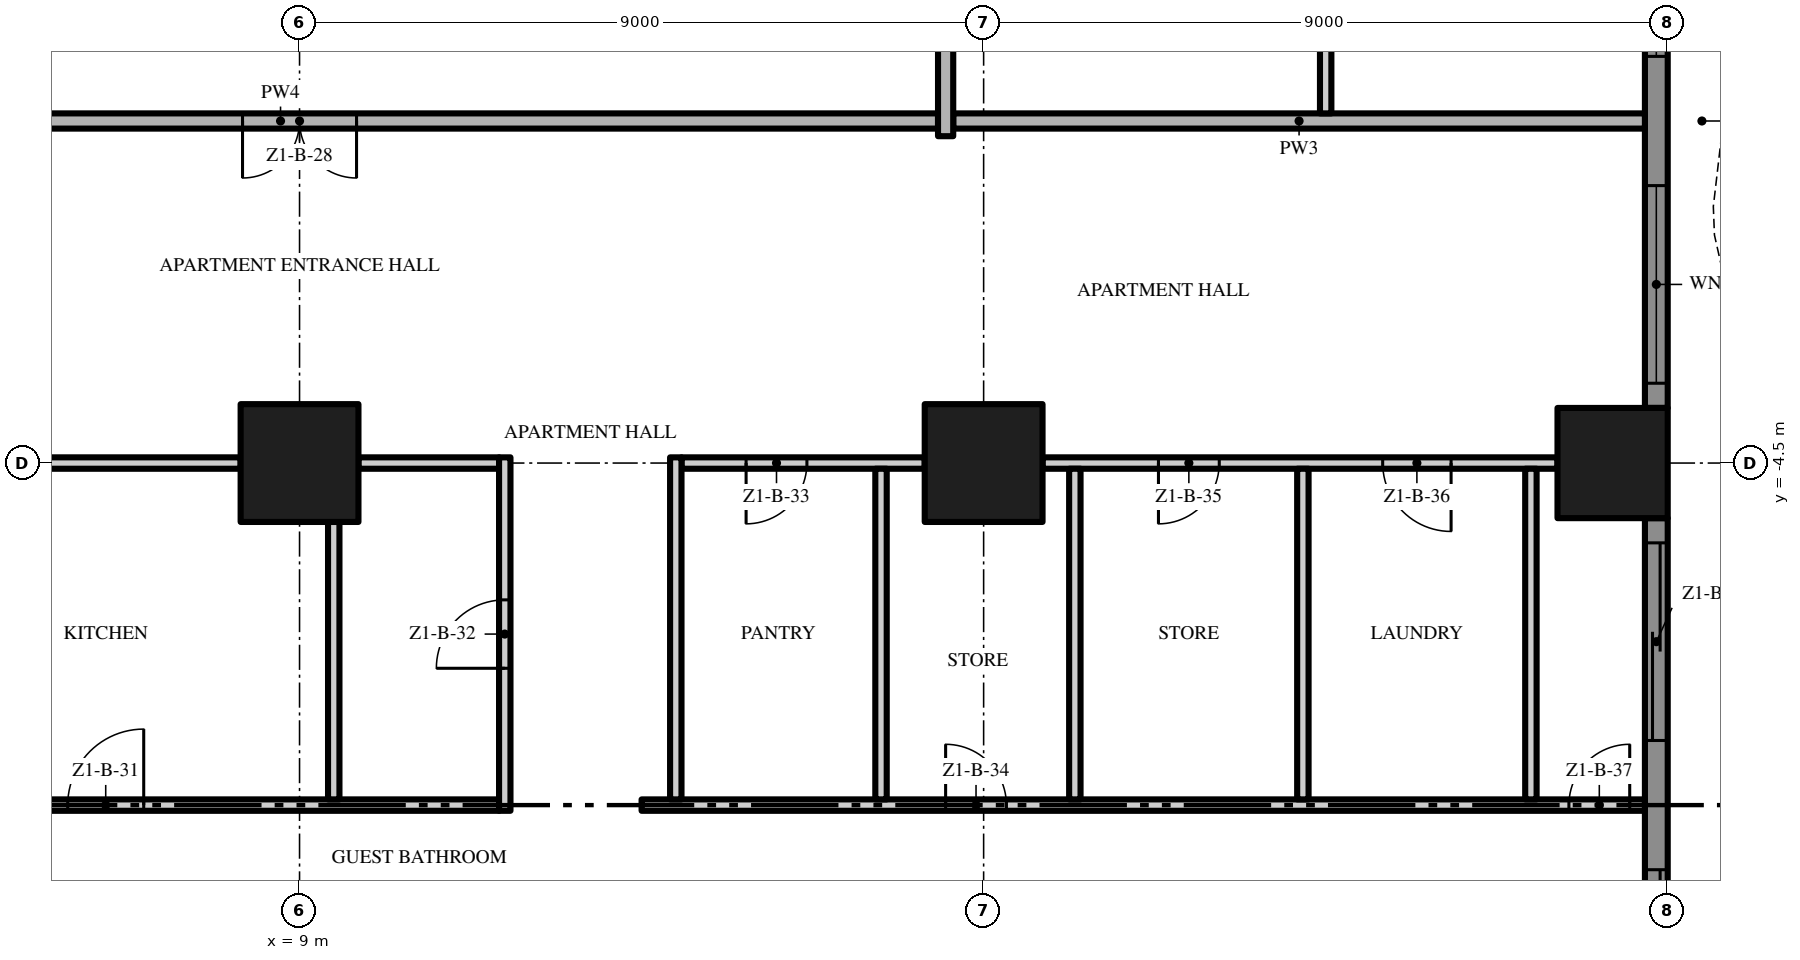
"""IFC4 building model, lengths in metres.
Left out: names, types, materials, properties, quantities, classifications, styles, units other than length and angle.
Written with IfcOpenShell. Run it as: python <this file> out.ifc"""

import sys

from ifc_helpers import new_model, si_unit, direction, frame, frame_2d, origin, origin_2d, place, context, subcontext, project, spatial, polyline, rectangle, outline, extrude, element, fill, save


model = new_model("IFC4")
c1 = context("Model", 3, precision=1e-05, world=origin(), true_north=direction((0.0, 1.0)))
c2 = subcontext(c1, "Body", "Model", "MODEL_VIEW")
j1 = project(units=[si_unit("LENGTHUNIT", "METRE"), si_unit("PLANEANGLEUNIT", "RADIAN")], contexts=[c1])
p1 = place(None, origin())
s1 = spatial("IfcSite", under=j1, at=p1, CompositionType="ELEMENT")
p2 = place(p1, origin())
s2 = spatial("IfcBuilding", under=s1, at=p2, CompositionType="ELEMENT")
p3 = place(p2, frame((0.0, 0.0, 34.0)))
s3 = spatial("IfcBuildingStorey", under=s2, at=p3, CompositionType="ELEMENT", Elevation=34.0)
p4 = place(p3, frame((18.0, -4.5, 0.0), z_axis=(0.0, 0.0, 1.0), x_axis=(1.0, 0.0, 0.0)))
e1 = element("IfcColumn", 1, at=p4, inside=s3, PredefinedType="COLUMN", context=c2, shape_type="SweptSolid", body=[
    extrude(rectangle(XDim=1.55, YDim=1.55, at=origin_2d()), origin(), (0.0, 0.0, 1.0), 3.5),
])
p5 = place(p3, frame((26.275, -4.5, 0.0), z_axis=(0.0, 0.0, 1.0), x_axis=(1.0, 0.0, 0.0)))
e2 = element("IfcColumn", 2, at=p5, inside=s3, PredefinedType="COLUMN", context=c2, shape_type="SweptSolid", body=[
    extrude(rectangle(XDim=1.45, YDim=1.45, at=origin_2d()), origin(), (0.0, 0.0, 1.0), 3.5),
])
p6 = place(p3, frame((9.0, -4.5, 0.0), z_axis=(0.0, 0.0, 1.0), x_axis=(1.0, 0.0, 0.0)))
e3 = element("IfcColumn", 3, at=p6, inside=s3, PredefinedType="COLUMN", context=c2, shape_type="SweptSolid", body=[
    extrude(rectangle(XDim=1.55, YDim=1.55, at=origin_2d()), origin(), (0.0, 0.0, 1.0), 3.5),
])
p7 = place(p3, frame((26.85, -5.225, 0.0), z_axis=(0.0, 0.0, 1.0), x_axis=(0.0, -1.0, 0.0)))
e4 = element("IfcWall", 4, at=p7, inside=s3, PredefinedType="SOLIDWALL", context=c2, shape_type="SweptSolid", body=[
    extrude(rectangle(XDim=7.55, YDim=0.3, at=frame_2d((3.775, 0.0))), origin(), (0.0, 0.0, 1.0), 3.5),
])
p8 = place(p7, frame((4.625, 0.0, 0.0)))
e5 = element("IfcOpeningElement", 5, at=p8, cuts=e4, PredefinedType="OPENING", context=c2, shape_type="SweptSolid", body=[
    extrude(rectangle(XDim=2.6, YDim=2.4, at=frame_2d((1.3, 1.2))), frame((0.0, 0.16, 0.0), z_axis=(0.0, -1.0, 0.0), x_axis=(1.0, 0.0, 0.0)), (0.0, 0.0, 1.0), 0.32),
])
p9 = place(p7, frame((0.325, 0.0, 0.0)))
e6 = element("IfcOpeningElement", 6, at=p9, cuts=e4, PredefinedType="OPENING", context=c2, shape_type="SweptSolid", body=[
    extrude(rectangle(XDim=2.6, YDim=2.4, at=frame_2d((1.3, 1.2))), frame((0.0, 0.16, 0.0), z_axis=(0.0, -1.0, 0.0), x_axis=(1.0, 0.0, 0.0)), (0.0, 0.0, 1.0), 0.32),
])
p10 = place(p3, frame((26.85, 3.775, 0.0), z_axis=(0.0, 0.0, 1.0), x_axis=(0.0, -1.0, 0.0)))
e7 = element("IfcWall", 7, at=p10, inside=s3, PredefinedType="SOLIDWALL", context=c2, shape_type="SweptSolid", body=[
    extrude(rectangle(XDim=7.55, YDim=0.3, at=frame_2d((3.775, 0.0))), origin(), (0.0, 0.0, 1.0), 3.5),
])
p11 = place(p10, frame((4.625, 0.0, 0.45)))
e8 = element("IfcOpeningElement", 8, at=p11, cuts=e7, PredefinedType="OPENING", context=c2, shape_type="SweptSolid", body=[
    extrude(rectangle(XDim=2.6, YDim=2.65, at=frame_2d((1.3, 1.325))), frame((0.0, 0.16, 0.0), z_axis=(0.0, -1.0, 0.0), x_axis=(1.0, 0.0, 0.0)), (0.0, 0.0, 1.0), 0.32),
])
p12 = place(p10, frame((0.325, 0.0, 0.45)))
e9 = element("IfcOpeningElement", 9, at=p12, cuts=e7, PredefinedType="OPENING", context=c2, shape_type="SweptSolid", body=[
    extrude(rectangle(XDim=2.6, YDim=2.65, at=frame_2d((1.3, 1.325))), frame((0.0, 0.16, 0.0), z_axis=(0.0, -1.0, 0.0), x_axis=(1.0, 0.0, 0.0)), (0.0, 0.0, 1.0), 0.32),
])
p13 = place(p3, origin())
e10 = element("IfcWall", 10, at=p13, inside=s3, PredefinedType="USERDEFINED", context=c2, shape_type="SweptSolid", body=[
    extrude(outline(polyline([(27.951, -18.0), (27.615, -16.5), (27.6, -16.125), (27.731, -15.0), (28.255, -13.5), (28.988, -12.0), (29.649, -10.5), (29.985, -9.0), (30.0, -8.625), (29.869, -7.5), (29.345, -6.0), (28.612, -4.5), (27.951, -3.0), (27.615, -1.5), (27.6, -1.125), (27.731, 0.0), (28.255, 1.5), (28.988, 3.0), (29.649, 4.5), (29.985, 6.0), (30.0, 6.375), (29.869, 7.5), (29.345, 9.0), (28.612, 10.5), (27.951, 12.0), (27.615, 13.5), (27.6, 13.875), (27.731, 15.0), (28.255, 16.5), (28.988, 18.0), (28.763, 18.11), (28.024, 16.596), (27.486, 15.056), (27.349, 13.885), (27.366, 13.467), (27.713, 11.921), (28.385, 10.395), (29.114, 8.904), (29.624, 7.444), (29.749, 6.365), (29.736, 6.033), (29.41, 4.579), (28.761, 3.105), (28.024, 1.596), (27.486, 0.056), (27.349, -1.115), (27.366, -1.533), (27.713, -3.079), (28.385, -4.605), (29.114, -6.096), (29.624, -7.556), (29.749, -8.635), (29.736, -8.967), (29.41, -10.421), (28.761, -11.895), (28.024, -13.404), (27.486, -14.944), (27.349, -16.115), (27.366, -16.533), (27.708, -18.055), (27.951, -18.0)])), origin(), (0.0, 0.0, 1.0), 0.9),
])
p14 = place(p3, frame((0.1, -9.0, 0.0), z_axis=(0.0, 0.0, 1.0), x_axis=(1.0, 0.0, 0.0)))
e11 = element("IfcWall", 11, at=p14, inside=s3, PredefinedType="PARTITIONING", context=c2, shape_type="SweptSolid", body=[
    extrude(rectangle(XDim=11.525, YDim=0.15, at=frame_2d((5.763, 0.0))), origin(), (0.0, 0.0, 1.0), 3.5),
])
p15 = place(p14, frame((0.4, 0.0, 0.0)))
e12 = element("IfcOpeningElement", 12, at=p15, cuts=e11, PredefinedType="OPENING", context=c2, shape_type="SweptSolid", body=[
    extrude(rectangle(XDim=0.8, YDim=2.0, at=frame_2d((0.4, 1.0))), frame((0.0, 0.085, 0.0), z_axis=(0.0, -1.0, 0.0), x_axis=(1.0, 0.0, 0.0)), (0.0, 0.0, 1.0), 0.17),
])
p16 = place(p14, frame((5.85, 0.0, 0.0)))
e13 = element("IfcOpeningElement", 13, at=p16, cuts=e11, PredefinedType="OPENING", context=c2, shape_type="SweptSolid", body=[
    extrude(rectangle(XDim=1.0, YDim=2.4, at=frame_2d((0.5, 1.2))), frame((0.0, 0.085, 0.0), z_axis=(0.0, -1.0, 0.0), x_axis=(1.0, 0.0, 0.0)), (0.0, 0.0, 1.0), 0.17),
])
p17 = place(p3, frame((13.5, -9.0, 0.0), z_axis=(0.0, 0.0, 1.0), x_axis=(1.0, 0.0, 0.0)))
e14 = element("IfcWall", 14, at=p17, inside=s3, PredefinedType="PARTITIONING", context=c2, shape_type="SweptSolid", body=[
    extrude(rectangle(XDim=13.2, YDim=0.15, at=frame_2d((6.6, 0.0))), origin(), (0.0, 0.0, 1.0), 3.5),
])
p18 = place(p17, frame((4.0, 0.0, 0.0)))
e15 = element("IfcOpeningElement", 15, at=p18, cuts=e14, PredefinedType="OPENING", context=c2, shape_type="SweptSolid", body=[
    extrude(rectangle(XDim=0.8, YDim=2.0, at=frame_2d((0.4, 1.0))), frame((0.0, 0.085, 0.0), z_axis=(0.0, -1.0, 0.0), x_axis=(1.0, 0.0, 0.0)), (0.0, 0.0, 1.0), 0.17),
])
p19 = place(p17, frame((12.2, 0.0, 0.0)))
e16 = element("IfcOpeningElement", 16, at=p19, cuts=e14, PredefinedType="OPENING", context=c2, shape_type="SweptSolid", body=[
    extrude(rectangle(XDim=0.8, YDim=2.0, at=frame_2d((0.4, 1.0))), frame((0.0, 0.085, 0.0), z_axis=(0.0, -1.0, 0.0), x_axis=(1.0, 0.0, 0.0)), (0.0, 0.0, 1.0), 0.17),
])
p20 = place(p3, frame((8.225, -4.5, 0.0), z_axis=(0.0, 0.0, 1.0), x_axis=(-1.0, 0.0, 0.0)))
e17 = element("IfcWall", 17, at=p20, inside=s3, PredefinedType="PARTITIONING", context=c2, shape_type="SweptSolid", body=[
    extrude(rectangle(XDim=7.45, YDim=0.15, at=frame_2d((3.725, 0.0))), origin(), (0.0, 0.0, 1.0), 3.5),
])
p21 = place(p20, frame((5.225, 0.0, 0.0)))
e18 = element("IfcOpeningElement", 18, at=p21, cuts=e17, PredefinedType="OPENING", context=c2, shape_type="SweptSolid", body=[
    extrude(rectangle(XDim=0.8, YDim=2.0, at=frame_2d((0.4, 1.0))), frame((0.0, 0.085, 0.0), z_axis=(0.0, -1.0, 0.0), x_axis=(1.0, 0.0, 0.0)), (0.0, 0.0, 1.0), 0.17),
])
p22 = place(p3, frame((9.775, -4.5, 0.0), z_axis=(0.0, 0.0, 1.0), x_axis=(1.0, 0.0, 0.0)))
e19 = element("IfcWall", 19, at=p22, inside=s3, PredefinedType="PARTITIONING", context=c2, shape_type="SweptSolid", body=[
    extrude(rectangle(XDim=1.85, YDim=0.15, at=frame_2d((0.925, 0.0))), origin(), (0.0, 0.0, 1.0), 3.5),
])
p23 = place(p3, frame((17.225, -4.5, 0.0), z_axis=(0.0, 0.0, 1.0), x_axis=(-1.0, 0.0, 0.0)))
e20 = element("IfcWall", 20, at=p23, inside=s3, PredefinedType="PARTITIONING", context=c2, shape_type="SweptSolid", body=[
    extrude(rectangle(XDim=3.2, YDim=0.15, at=frame_2d((1.6, 0.0))), origin(), (0.0, 0.0, 1.0), 3.5),
])
p24 = place(p23, frame((1.55, 0.0, 0.0)))
e21 = element("IfcOpeningElement", 21, at=p24, cuts=e20, PredefinedType="OPENING", context=c2, shape_type="SweptSolid", body=[
    extrude(rectangle(XDim=0.8, YDim=2.0, at=frame_2d((0.4, 1.0))), frame((0.0, 0.085, 0.0), z_axis=(0.0, -1.0, 0.0), x_axis=(1.0, 0.0, 0.0)), (0.0, 0.0, 1.0), 0.17),
])
p25 = place(p3, frame((25.55, -4.5, 0.0), z_axis=(0.0, 0.0, 1.0), x_axis=(-1.0, 0.0, 0.0)))
e22 = element("IfcWall", 22, at=p25, inside=s3, PredefinedType="PARTITIONING", context=c2, shape_type="SweptSolid", body=[
    extrude(rectangle(XDim=6.775, YDim=0.15, at=frame_2d((3.388, 0.0))), origin(), (0.0, 0.0, 1.0), 3.5),
])
p26 = place(p25, frame((4.45, 0.0, 0.0)))
e23 = element("IfcOpeningElement", 23, at=p26, cuts=e22, PredefinedType="OPENING", context=c2, shape_type="SweptSolid", body=[
    extrude(rectangle(XDim=0.8, YDim=2.0, at=frame_2d((0.4, 1.0))), frame((0.0, 0.085, 0.0), z_axis=(0.0, -1.0, 0.0), x_axis=(1.0, 0.0, 0.0)), (0.0, 0.0, 1.0), 0.17),
])
p27 = place(p25, frame((1.4, 0.0, 0.0)))
e24 = element("IfcOpeningElement", 24, at=p27, cuts=e22, PredefinedType="OPENING", context=c2, shape_type="SweptSolid", body=[
    extrude(rectangle(XDim=0.9, YDim=2.1, at=frame_2d((0.45, 1.05))), frame((0.0, 0.085, 0.0), z_axis=(0.0, -1.0, 0.0), x_axis=(1.0, 0.0, 0.0)), (0.0, 0.0, 1.0), 0.17),
])
p28 = place(p3, frame((17.4, 0.0, 0.0), z_axis=(0.0, 0.0, 1.0), x_axis=(-1.0, 0.0, 0.0)))
e25 = element("IfcWall", 25, at=p28, inside=s3, PredefinedType="PARTITIONING", context=c2, shape_type="SweptSolid", body=[
    extrude(rectangle(XDim=17.3, YDim=0.2, at=frame_2d((8.65, 0.0))), origin(), (0.0, 0.0, 1.0), 3.5),
])
p29 = place(p28, frame((7.65, 0.0, 0.0)))
e26 = element("IfcOpeningElement", 26, at=p29, cuts=e25, PredefinedType="OPENING", context=c2, shape_type="SweptSolid", body=[
    extrude(rectangle(XDim=1.5, YDim=2.4, at=frame_2d((0.75, 1.2))), frame((0.0, 0.11, 0.0), z_axis=(0.0, -1.0, 0.0), x_axis=(1.0, 0.0, 0.0)), (0.0, 0.0, 1.0), 0.22),
])
p30 = place(p3, frame((17.6, 0.0, 0.0), z_axis=(0.0, 0.0, 1.0), x_axis=(1.0, 0.0, 0.0)))
e27 = element("IfcWall", 27, at=p30, inside=s3, PredefinedType="PARTITIONING", context=c2, shape_type="SweptSolid", body=[
    extrude(rectangle(XDim=9.1, YDim=0.2, at=frame_2d((4.55, 0.0))), origin(), (0.0, 0.0, 1.0), 3.5),
])
p31 = place(p3, frame((9.45, -8.925, 0.0), z_axis=(0.0, 0.0, 1.0), x_axis=(0.0, 1.0, 0.0)))
e28 = element("IfcWall", 28, at=p31, inside=s3, PredefinedType="PARTITIONING", context=c2, shape_type="SweptSolid", body=[
    extrude(rectangle(XDim=3.65, YDim=0.15, at=frame_2d((1.825, 0.0))), origin(), (0.0, 0.0, 1.0), 3.5),
])
p32 = place(p3, frame((11.7, -9.075, 0.0), z_axis=(0.0, 0.0, 1.0), x_axis=(0.0, 1.0, 0.0)))
e29 = element("IfcWall", 29, at=p32, inside=s3, PredefinedType="PARTITIONING", context=c2, shape_type="SweptSolid", body=[
    extrude(rectangle(XDim=4.65, YDim=0.15, at=frame_2d((2.325, 0.0))), origin(), (0.0, 0.0, 1.0), 3.5),
])
p33 = place(p32, frame((1.875, 0.0, 0.0)))
e30 = element("IfcOpeningElement", 30, at=p33, cuts=e29, PredefinedType="OPENING", context=c2, shape_type="SweptSolid", body=[
    extrude(rectangle(XDim=0.9, YDim=2.1, at=frame_2d((0.45, 1.05))), frame((0.0, 0.085, 0.0), z_axis=(0.0, -1.0, 0.0), x_axis=(1.0, 0.0, 0.0)), (0.0, 0.0, 1.0), 0.17),
])
p34 = place(p3, frame((13.95, -8.925, 0.0), z_axis=(0.0, 0.0, 1.0), x_axis=(0.0, 1.0, 0.0)))
e31 = element("IfcWall", 31, at=p34, inside=s3, PredefinedType="PARTITIONING", context=c2, shape_type="SweptSolid", body=[
    extrude(rectangle(XDim=4.5, YDim=0.15, at=frame_2d((2.25, 0.0))), origin(), (0.0, 0.0, 1.0), 3.5),
])
p35 = place(p3, frame((16.65, -8.925, 0.0), z_axis=(0.0, 0.0, 1.0), x_axis=(0.0, 1.0, 0.0)))
e32 = element("IfcWall", 32, at=p35, inside=s3, PredefinedType="PARTITIONING", context=c2, shape_type="SweptSolid", body=[
    extrude(rectangle(XDim=4.35, YDim=0.15, at=frame_2d((2.175, 0.0))), origin(), (0.0, 0.0, 1.0), 3.5),
])
p36 = place(p3, frame((17.5, -0.2, 0.0), z_axis=(0.0, 0.0, 1.0), x_axis=(0.0, 1.0, 0.0)))
e33 = element("IfcWall", 33, at=p36, inside=s3, PredefinedType="PARTITIONING", context=c2, shape_type="SweptSolid", body=[
    extrude(rectangle(XDim=3.925, YDim=0.2, at=frame_2d((1.962, 0.0))), origin(), (0.0, 0.0, 1.0), 3.5),
])
for number, where, z_axis, x_axis in (
    (34, (19.2, -8.925, 0.0), (0.0, 0.0, 1.0), (0.0, 1.0, 0.0)),
    (35, (22.2, -8.925, 0.0), (0.0, 0.0, 1.0), (0.0, 1.0, 0.0)),
):
    element("IfcWall", number, at=place(p3, frame(where, z_axis=z_axis, x_axis=x_axis)), inside=s3, PredefinedType="PARTITIONING", context=c2, shape_type="SweptSolid", body=[
        extrude(rectangle(XDim=4.35, YDim=0.15, at=frame_2d((2.175, 0.0))), origin(), (0.0, 0.0, 1.0), 3.5),
    ])
p37 = place(p3, frame((22.5, 17.275, 0.0), z_axis=(0.0, 0.0, 1.0), x_axis=(0.0, -1.0, 0.0)))
e36 = element("IfcWall", 36, at=p37, inside=s3, PredefinedType="PARTITIONING", context=c2, shape_type="SweptSolid", body=[
    extrude(rectangle(XDim=17.175, YDim=0.15, at=frame_2d((8.588, 0.0))), origin(), (0.0, 0.0, 1.0), 3.5),
])
p38 = place(p37, frame((14.525, 0.0, 0.0)))
e37 = element("IfcOpeningElement", 37, at=p38, cuts=e36, PredefinedType="OPENING", context=c2, shape_type="SweptSolid", body=[
    extrude(rectangle(XDim=1.0, YDim=2.4, at=frame_2d((0.5, 1.2))), frame((0.0, 0.085, 0.0), z_axis=(0.0, -1.0, 0.0), x_axis=(1.0, 0.0, 0.0)), (0.0, 0.0, 1.0), 0.17),
])
p39 = place(p37, frame((8.925, 0.0, 0.0)))
e38 = element("IfcOpeningElement", 38, at=p39, cuts=e36, PredefinedType="OPENING", context=c2, shape_type="SweptSolid", body=[
    extrude(rectangle(XDim=1.0, YDim=2.4, at=frame_2d((0.5, 1.2))), frame((0.0, 0.085, 0.0), z_axis=(0.0, -1.0, 0.0), x_axis=(1.0, 0.0, 0.0)), (0.0, 0.0, 1.0), 0.17),
])
p40 = place(p37, frame((3.975, 0.0, 0.0)))
e39 = element("IfcOpeningElement", 39, at=p40, cuts=e36, PredefinedType="OPENING", context=c2, shape_type="SweptSolid", body=[
    extrude(rectangle(XDim=1.8, YDim=2.4, at=frame_2d((0.9, 1.2))), frame((0.0, 0.085, 0.0), z_axis=(0.0, -1.0, 0.0), x_axis=(1.0, 0.0, 0.0)), (0.0, 0.0, 1.0), 0.17),
])
p41 = place(p3, frame((25.2, -8.925, 0.0), z_axis=(0.0, 0.0, 1.0), x_axis=(0.0, 1.0, 0.0)))
e40 = element("IfcWall", 40, at=p41, inside=s3, PredefinedType="PARTITIONING", context=c2, shape_type="SweptSolid", body=[
    extrude(rectangle(XDim=4.35, YDim=0.15, at=frame_2d((2.175, 0.0))), origin(), (0.0, 0.0, 1.0), 3.5),
])
p42 = place(p8, origin())
e41 = element("IfcDoor", 41, at=p42, inside=s3, OperationType="SINGLE_SWING_LEFT", PredefinedType="DOOR", context=c2, shape_type="SweptSolid", body=[
    extrude(rectangle(XDim=2.6, YDim=2.4, at=frame_2d((1.3, 1.2))), frame((0.0, 0.025, 0.0), z_axis=(0.0, -1.0, 0.0), x_axis=(1.0, 0.0, 0.0)), (0.0, 0.0, 1.0), 0.05),
])
fill(e5, e41)
p43 = place(p9, origin())
e42 = element("IfcDoor", 42, at=p43, inside=s3, OperationType="SINGLE_SWING_LEFT", PredefinedType="DOOR", context=c2, shape_type="SweptSolid", body=[
    extrude(rectangle(XDim=2.6, YDim=2.4, at=frame_2d((1.3, 1.2))), frame((0.0, 0.025, 0.0), z_axis=(0.0, -1.0, 0.0), x_axis=(1.0, 0.0, 0.0)), (0.0, 0.0, 1.0), 0.05),
])
fill(e6, e42)
p44 = place(p11, origin())
e43 = element("IfcWindow", 43, at=p44, inside=s3, PartitioningType="SINGLE_PANEL", PredefinedType="WINDOW", context=c2, shape_type="SweptSolid", body=[
    extrude(rectangle(XDim=2.6, YDim=2.65, at=frame_2d((1.3, 1.325))), frame((0.0, 0.03, 0.0), z_axis=(0.0, -1.0, 0.0), x_axis=(1.0, 0.0, 0.0)), (0.0, 0.0, 1.0), 0.06),
])
fill(e8, e43)
p45 = place(p12, origin())
e44 = element("IfcWindow", 44, at=p45, inside=s3, PartitioningType="SINGLE_PANEL", PredefinedType="WINDOW", context=c2, shape_type="SweptSolid", body=[
    extrude(rectangle(XDim=2.6, YDim=2.65, at=frame_2d((1.3, 1.325))), frame((0.0, 0.03, 0.0), z_axis=(0.0, -1.0, 0.0), x_axis=(1.0, 0.0, 0.0)), (0.0, 0.0, 1.0), 0.06),
])
fill(e9, e44)
p46 = place(p29, origin())
e45 = element("IfcDoor", 45, at=p46, inside=s3, OperationType="DOUBLE_DOOR_SINGLE_SWING", PredefinedType="DOOR", context=c2, shape_type="SweptSolid", body=[
    extrude(rectangle(XDim=1.5, YDim=2.4, at=frame_2d((0.75, 1.2))), frame((0.0, 0.025, 0.0), z_axis=(0.0, -1.0, 0.0), x_axis=(1.0, 0.0, 0.0)), (0.0, 0.0, 1.0), 0.05),
])
fill(e26, e45)
p47 = place(p16, origin())
e46 = element("IfcDoor", 46, at=p47, inside=s3, OperationType="SINGLE_SWING_RIGHT", PredefinedType="DOOR", context=c2, shape_type="SweptSolid", body=[
    extrude(rectangle(XDim=1.0, YDim=2.4, at=frame_2d((0.5, 1.2))), frame((0.0, 0.025, 0.0), z_axis=(0.0, -1.0, 0.0), x_axis=(1.0, 0.0, 0.0)), (0.0, 0.0, 1.0), 0.05),
])
fill(e13, e46)
p48 = place(p33, origin())
e47 = element("IfcDoor", 47, at=p48, inside=s3, OperationType="SINGLE_SWING_LEFT", PredefinedType="DOOR", context=c2, shape_type="SweptSolid", body=[
    extrude(rectangle(XDim=0.9, YDim=2.1, at=frame_2d((0.45, 1.05))), frame((0.0, 0.025, 0.0), z_axis=(0.0, -1.0, 0.0), x_axis=(1.0, 0.0, 0.0)), (0.0, 0.0, 1.0), 0.05),
])
fill(e30, e47)
p49 = place(p24, origin())
e48 = element("IfcDoor", 48, at=p49, inside=s3, OperationType="SINGLE_SWING_RIGHT", PredefinedType="DOOR", context=c2, shape_type="SweptSolid", body=[
    extrude(rectangle(XDim=0.8, YDim=2.0, at=frame_2d((0.4, 1.0))), frame((0.0, 0.025, 0.0), z_axis=(0.0, -1.0, 0.0), x_axis=(1.0, 0.0, 0.0)), (0.0, 0.0, 1.0), 0.05),
])
fill(e21, e48)
p50 = place(p18, origin())
e49 = element("IfcDoor", 49, at=p50, inside=s3, OperationType="SINGLE_SWING_LEFT", PredefinedType="DOOR", context=c2, shape_type="SweptSolid", body=[
    extrude(rectangle(XDim=0.8, YDim=2.0, at=frame_2d((0.4, 1.0))), frame((0.0, 0.025, 0.0), z_axis=(0.0, -1.0, 0.0), x_axis=(1.0, 0.0, 0.0)), (0.0, 0.0, 1.0), 0.05),
])
fill(e15, e49)
p51 = place(p26, origin())
e50 = element("IfcDoor", 50, at=p51, inside=s3, OperationType="SINGLE_SWING_RIGHT", PredefinedType="DOOR", context=c2, shape_type="SweptSolid", body=[
    extrude(rectangle(XDim=0.8, YDim=2.0, at=frame_2d((0.4, 1.0))), frame((0.0, 0.025, 0.0), z_axis=(0.0, -1.0, 0.0), x_axis=(1.0, 0.0, 0.0)), (0.0, 0.0, 1.0), 0.05),
])
fill(e23, e50)
p52 = place(p27, origin())
e51 = element("IfcDoor", 51, at=p52, inside=s3, OperationType="SINGLE_SWING_LEFT", PredefinedType="DOOR", context=c2, shape_type="SweptSolid", body=[
    extrude(rectangle(XDim=0.9, YDim=2.1, at=frame_2d((0.45, 1.05))), frame((0.0, 0.025, 0.0), z_axis=(0.0, -1.0, 0.0), x_axis=(1.0, 0.0, 0.0)), (0.0, 0.0, 1.0), 0.05),
])
fill(e24, e51)
p53 = place(p19, origin())
e52 = element("IfcDoor", 52, at=p53, inside=s3, OperationType="SINGLE_SWING_RIGHT", PredefinedType="DOOR", context=c2, shape_type="SweptSolid", body=[
    extrude(rectangle(XDim=0.8, YDim=2.0, at=frame_2d((0.4, 1.0))), frame((0.0, 0.025, 0.0), z_axis=(0.0, -1.0, 0.0), x_axis=(1.0, 0.0, 0.0)), (0.0, 0.0, 1.0), 0.05),
])
fill(e16, e52)
save(model, sys.argv[1])
